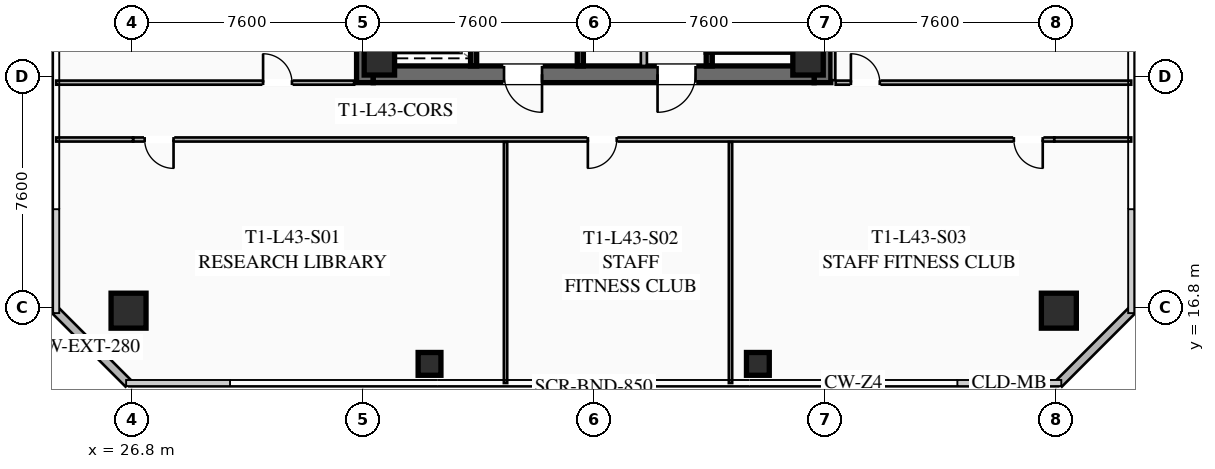
"""IFC4 building model, lengths in metres.
Left out: names, types, materials, properties, quantities, classifications, styles, units other than length and angle.
Written with IfcOpenShell. Run it as: python <this file> out.ifc"""

import sys

from ifc_helpers import new_model, si_unit, direction, frame, frame_2d, origin, origin_2d, place, context, subcontext, project, spatial, rectangle, hollow_rectangle, extrude, element, fill, save


model = new_model("IFC4")
c1 = context("Model", 3, precision=1e-05, world=origin(), true_north=direction((0.0, 1.0)))
c2 = subcontext(c1, "Body", "Model", "MODEL_VIEW")
j1 = project(units=[si_unit("LENGTHUNIT", "METRE"), si_unit("PLANEANGLEUNIT", "RADIAN")], contexts=[c1])
p1 = place(None, origin())
s1 = spatial("IfcSite", under=j1, at=p1, CompositionType="ELEMENT")
p2 = place(p1, origin())
s2 = spatial("IfcBuilding", under=s1, at=p2, CompositionType="ELEMENT")
p3 = place(p2, frame((0.0, 0.0, 160.55)))
s3 = spatial("IfcBuildingStorey", under=s2, at=p3, CompositionType="ELEMENT", Elevation=160.55)
for number, where, z_axis, x_axis in (
    (1, (34.475, 24.2, 0.0), (0.0, 0.0, 1.0), (0.0, 1.0, 0.0)),
    (2, (49.525, 39.8, 0.0), (0.0, 0.0, 1.0), (0.0, -1.0, 0.0)),
):
    element("IfcWall", number, at=place(p3, frame(where, z_axis=z_axis, x_axis=x_axis)), inside=s3, PredefinedType="SHEAR", context=c2, shape_type="SweptSolid", body=[
        extrude(rectangle(XDim=15.6, YDim=0.55, at=frame_2d((7.8, 0.0))), origin(), (0.0, 0.0, 1.0), 3.55),
    ])
p4 = place(p3, frame((49.25, 24.475, 0.0), z_axis=(0.0, 0.0, 1.0), x_axis=(-1.0, 0.0, 0.0)))
e3 = element("IfcWall", 3, at=p4, inside=s3, PredefinedType="SHEAR", context=c2, shape_type="SweptSolid", body=[
    extrude(rectangle(XDim=14.5, YDim=0.55, at=frame_2d((7.25, 0.0))), origin(), (0.0, 0.0, 1.0), 3.55),
])
p5 = place(p4, frame((8.95, 0.0, 0.0)))
e4 = element("IfcOpeningElement", 4, at=p5, cuts=e3, PredefinedType="OPENING", context=c2, shape_type="SweptSolid", body=[
    extrude(rectangle(XDim=1.25, YDim=2.25, at=frame_2d((0.625, 1.125))), frame((0.0, 0.285, 0.0), z_axis=(0.0, -1.0, 0.0), x_axis=(1.0, 0.0, 0.0)), (0.0, 0.0, 1.0), 0.57),
])
p6 = place(p4, frame((3.9, 0.0, 0.0)))
e5 = element("IfcOpeningElement", 5, at=p6, cuts=e3, PredefinedType="OPENING", context=c2, shape_type="SweptSolid", body=[
    extrude(rectangle(XDim=1.25, YDim=2.25, at=frame_2d((0.625, 1.125))), frame((0.0, 0.285, 0.0), z_axis=(0.0, -1.0, 0.0), x_axis=(1.0, 0.0, 0.0)), (0.0, 0.0, 1.0), 0.57),
])
for number, where, z_axis, x_axis in (
    (6, (34.95, 24.95, 0.0), (0.0, 0.0, 1.0), (1.0, 0.0, 0.0)),
    (7, (49.05, 24.95, 0.0), (0.0, 0.0, 1.0), (1.0, 0.0, 0.0)),
):
    element("IfcColumn", number, at=place(p3, frame(where, z_axis=z_axis, x_axis=x_axis)), inside=s3, PredefinedType="COLUMN", context=c2, shape_type="SweptSolid", body=[
        extrude(hollow_rectangle(XDim=1.0, YDim=1.0, WallThickness=0.04, at=origin_2d()), origin(), (0.0, 0.0, 1.0), 3.37),
    ])
for number, where, z_axis, x_axis in (
    (8, (26.7, 16.7, 0.0), (0.0, 0.0, 1.0), (1.0, 0.0, 0.0)),
    (9, (57.3, 16.7, 0.0), (0.0, 0.0, 1.0), (1.0, 0.0, 0.0)),
):
    element("IfcColumn", number, at=place(p3, frame(where, z_axis=z_axis, x_axis=x_axis)), inside=s3, PredefinedType="COLUMN", context=c2, shape_type="SweptSolid", body=[
        extrude(hollow_rectangle(XDim=1.15, YDim=1.15, WallThickness=0.045, at=origin_2d()), origin(), (0.0, 0.0, 1.0), 3.37),
    ])
for number, where, z_axis, x_axis in (
    (10, (36.6, 14.95, 0.0), (0.0, 0.0, 1.0), (1.0, 0.0, 0.0)),
    (11, (47.4, 14.95, 0.0), (0.0, 0.0, 1.0), (1.0, 0.0, 0.0)),
):
    element("IfcColumn", number, at=place(p3, frame(where, z_axis=z_axis, x_axis=x_axis)), inside=s3, PredefinedType="COLUMN", context=c2, shape_type="SweptSolid", body=[
        extrude(hollow_rectangle(XDim=0.75, YDim=0.75, WallThickness=0.032, at=origin_2d()), origin(), (0.0, 0.0, 1.0), 3.37),
    ])
for number, where, z_axis, x_axis in (
    (12, (26.7, 14.3, 0.0), (0.0, 0.0, 1.0), (-0.707, 0.707, 0.0)),
    (13, (59.7, 16.7, 0.0), (0.0, 0.0, 1.0), (-0.707, -0.707, 0.0)),
):
    element("IfcWall", number, at=place(p3, frame(where, z_axis=z_axis, x_axis=x_axis)), inside=s3, PredefinedType="SOLIDWALL", context=c2, shape_type="SweptSolid", body=[
        extrude(rectangle(XDim=3.394, YDim=0.28, at=frame_2d((1.697, 0.0))), origin(), (0.0, 0.0, 1.0), 3.37),
    ])
p7 = place(p3, frame((45.8, 32.8, 0.0), z_axis=(0.0, 0.0, 1.0), x_axis=(0.0, -1.0, 0.0)))
e14 = element("IfcWall", 14, at=p7, inside=s3, PredefinedType="SHEAR", context=c2, shape_type="SweptSolid", body=[
    extrude(rectangle(XDim=8.05, YDim=0.2, at=frame_2d((4.025, 0.0))), origin(), (0.0, 0.0, 1.0), 3.37),
])
p8 = place(p7, frame((0.45, 0.0, 0.0)))
e15 = element("IfcOpeningElement", 15, at=p8, cuts=e14, PredefinedType="OPENING", context=c2, shape_type="SweptSolid", body=[
    extrude(rectangle(XDim=1.15, YDim=2.2, at=frame_2d((0.575, 1.1))), frame((0.0, 0.11, 0.0), z_axis=(0.0, -1.0, 0.0), x_axis=(1.0, 0.0, 0.0)), (0.0, 0.0, 1.0), 0.22),
])
p9 = place(p3, frame((41.56, 24.75, 0.0), z_axis=(0.0, 0.0, 1.0), x_axis=(0.0, 1.0, 0.0)))
e16 = element("IfcWall", 16, at=p9, inside=s3, PredefinedType="SHEAR", context=c2, shape_type="SweptSolid", body=[
    extrude(rectangle(XDim=14.5, YDim=0.2, at=frame_2d((7.25, 0.0))), origin(), (0.0, 0.0, 1.0), 3.37),
])
p10 = place(p3, frame((38.05, 24.75, 0.0), z_axis=(0.0, 0.0, 1.0), x_axis=(0.0, 1.0, 0.0)))
e17 = element("IfcWall", 17, at=p10, inside=s3, PredefinedType="SHEAR", context=c2, shape_type="SweptSolid", body=[
    extrude(rectangle(XDim=6.45, YDim=0.2, at=frame_2d((3.225, 0.0))), origin(), (0.0, 0.0, 1.0), 3.37),
])
p11 = place(p10, frame((4.875, 0.0, 0.0)))
e18 = element("IfcOpeningElement", 18, at=p11, cuts=e17, PredefinedType="OPENING", context=c2, shape_type="SweptSolid", body=[
    extrude(rectangle(XDim=1.3, YDim=2.25, at=frame_2d((0.65, 1.125))), frame((0.0, 0.11, 0.0), z_axis=(0.0, -1.0, 0.0), x_axis=(1.0, 0.0, 0.0)), (0.0, 0.0, 1.0), 0.22),
])
p12 = place(p10, frame((2.875, 0.0, 0.0)))
e19 = element("IfcOpeningElement", 19, at=p12, cuts=e17, PredefinedType="OPENING", context=c2, shape_type="SweptSolid", body=[
    extrude(rectangle(XDim=1.3, YDim=2.25, at=frame_2d((0.65, 1.125))), frame((0.0, 0.11, 0.0), z_axis=(0.0, -1.0, 0.0), x_axis=(1.0, 0.0, 0.0)), (0.0, 0.0, 1.0), 0.22),
])
p13 = place(p10, frame((0.675, 0.0, 0.0)))
e20 = element("IfcOpeningElement", 20, at=p13, cuts=e17, PredefinedType="OPENING", context=c2, shape_type="SweptSolid", body=[
    extrude(rectangle(XDim=1.3, YDim=2.25, at=frame_2d((0.65, 1.125))), frame((0.0, 0.11, 0.0), z_axis=(0.0, -1.0, 0.0), x_axis=(1.0, 0.0, 0.0)), (0.0, 0.0, 1.0), 0.22),
])
p14 = place(p3, frame((43.65, 24.75, 0.0), z_axis=(0.0, 0.0, 1.0), x_axis=(0.0, 1.0, 0.0)))
e21 = element("IfcWall", 21, at=p14, inside=s3, PredefinedType="SOLIDWALL", context=c2, shape_type="SweptSolid", body=[
    extrude(rectangle(XDim=6.9, YDim=0.2, at=frame_2d((3.45, 0.0))), origin(), (0.0, 0.0, 1.0), 2.723),
])
p15 = place(p14, frame((0.85, 0.0, 0.0)))
e22 = element("IfcOpeningElement", 22, at=p15, cuts=e21, PredefinedType="OPENING", context=c2, shape_type="SweptSolid", body=[
    extrude(rectangle(XDim=0.95, YDim=2.05, at=frame_2d((0.475, 1.025))), frame((0.0, 0.11, 0.0), z_axis=(0.0, -1.0, 0.0), x_axis=(1.0, 0.0, 0.0)), (0.0, 0.0, 1.0), 0.22),
])
p16 = place(p14, frame((4.8, 0.0, 0.0)))
e23 = element("IfcOpeningElement", 23, at=p16, cuts=e21, PredefinedType="OPENING", context=c2, shape_type="SweptSolid", body=[
    extrude(rectangle(XDim=1.05, YDim=2.2, at=frame_2d((0.525, 1.1))), frame((0.0, 0.11, 0.0), z_axis=(0.0, -1.0, 0.0), x_axis=(1.0, 0.0, 0.0)), (0.0, 0.0, 1.0), 0.22),
])
p17 = place(p3, frame((57.15, 22.33, 0.0), z_axis=(0.0, 0.0, 1.0), x_axis=(-1.0, 0.0, 0.0)))
e24 = element("IfcWall", 24, at=p17, inside=s3, PredefinedType="PARTITIONING", context=c2, shape_type="SweptSolid", body=[
    extrude(rectangle(XDim=30.3, YDim=0.135, at=frame_2d((15.15, 0.0))), origin(), (0.0, 0.0, 1.0), 2.723),
])
p18 = place(p17, frame((28.97, 0.0, 0.0)))
e25 = element("IfcOpeningElement", 25, at=p18, cuts=e24, PredefinedType="OPENING", context=c2, shape_type="SweptSolid", body=[
    extrude(rectangle(XDim=0.95, YDim=2.05, at=frame_2d((0.475, 1.025))), frame((0.0, 0.077, 0.0), z_axis=(0.0, -1.0, 0.0), x_axis=(1.0, 0.0, 0.0)), (0.0, 0.0, 1.0), 0.155),
])
p19 = place(p17, frame((14.392, 0.0, 0.0)))
e26 = element("IfcOpeningElement", 26, at=p19, cuts=e24, PredefinedType="OPENING", context=c2, shape_type="SweptSolid", body=[
    extrude(rectangle(XDim=0.95, YDim=2.05, at=frame_2d((0.475, 1.025))), frame((0.0, 0.077, 0.0), z_axis=(0.0, -1.0, 0.0), x_axis=(1.0, 0.0, 0.0)), (0.0, 0.0, 1.0), 0.155),
])
p20 = place(p17, frame((0.38, 0.0, 0.0)))
e27 = element("IfcOpeningElement", 27, at=p20, cuts=e24, PredefinedType="OPENING", context=c2, shape_type="SweptSolid", body=[
    extrude(rectangle(XDim=0.95, YDim=2.05, at=frame_2d((0.475, 1.025))), frame((0.0, 0.077, 0.0), z_axis=(0.0, -1.0, 0.0), x_axis=(1.0, 0.0, 0.0)), (0.0, 0.0, 1.0), 0.155),
])
for number, where, z_axis, x_axis in (
    (28, (24.32, 22.33, 0.0), (0.0, 0.0, 1.0), (1.0, 0.0, 0.0)),
    (29, (57.15, 22.33, 0.0), (0.0, 0.0, 1.0), (1.0, 0.0, 0.0)),
):
    element("IfcWall", number, at=place(p3, frame(where, z_axis=z_axis, x_axis=x_axis)), inside=s3, PredefinedType="PARTITIONING", context=c2, shape_type="SweptSolid", body=[
        extrude(rectangle(XDim=2.53, YDim=0.135, at=frame_2d((1.265, 0.0))), origin(), (0.0, 0.0, 1.0), 2.723),
    ])
for number, where, z_axis, x_axis in (
    (30, (39.1, 14.32, 0.0), (0.0, 0.0, 1.0), (0.0, 1.0, 0.0)),
    (31, (46.5, 14.32, 0.0), (0.0, 0.0, 1.0), (0.0, 1.0, 0.0)),
):
    element("IfcWall", number, at=place(p3, frame(where, z_axis=z_axis, x_axis=x_axis)), inside=s3, PredefinedType="PARTITIONING", context=c2, shape_type="SweptSolid", body=[
        extrude(rectangle(XDim=7.93, YDim=0.11, at=frame_2d((3.965, 0.0))), origin(), (0.0, 0.0, 1.0), 2.723),
    ])
p21 = place(p3, frame((49.88, 39.72, 0.0), z_axis=(0.0, 0.0, 1.0), x_axis=(0.0, -1.0, 0.0)))
e32 = element("IfcWall", 32, at=p21, inside=s3, PredefinedType="PARTITIONING", context=c2, shape_type="SweptSolid", body=[
    extrude(rectangle(XDim=15.44, YDim=0.135, at=frame_2d((7.72, 0.0))), origin(), (0.0, 0.0, 1.0), 2.723),
])
p22 = place(p3, frame((49.96, 24.2, 0.0), z_axis=(0.0, 0.0, 1.0), x_axis=(1.0, 0.0, 0.0)))
e33 = element("IfcWall", 33, at=p22, inside=s3, PredefinedType="PARTITIONING", context=c2, shape_type="SweptSolid", body=[
    extrude(rectangle(XDim=9.72, YDim=0.135, at=frame_2d((4.86, 0.0))), origin(), (0.0, 0.0, 1.0), 2.723),
])
p23 = place(p22, frame((0.5, 0.0, 0.0)))
e34 = element("IfcOpeningElement", 34, at=p23, cuts=e33, PredefinedType="OPENING", context=c2, shape_type="SweptSolid", body=[
    extrude(rectangle(XDim=0.95, YDim=2.05, at=frame_2d((0.475, 1.025))), frame((0.0, 0.077, 0.0), z_axis=(0.0, -1.0, 0.0), x_axis=(1.0, 0.0, 0.0)), (0.0, 0.0, 1.0), 0.155),
])
p24 = place(p3, frame((24.32, 24.2, 0.0), z_axis=(0.0, 0.0, 1.0), x_axis=(1.0, 0.0, 0.0)))
e35 = element("IfcWall", 35, at=p24, inside=s3, PredefinedType="PARTITIONING", context=c2, shape_type="SweptSolid", body=[
    extrude(rectangle(XDim=9.8, YDim=0.135, at=frame_2d((4.9, 0.0))), origin(), (0.0, 0.0, 1.0), 2.723),
])
p25 = place(p24, frame((6.805, 0.0, 0.0)))
e36 = element("IfcOpeningElement", 36, at=p25, cuts=e35, PredefinedType="OPENING", context=c2, shape_type="SweptSolid", body=[
    extrude(rectangle(XDim=0.95, YDim=2.05, at=frame_2d((0.475, 1.025))), frame((0.0, 0.077, 0.0), z_axis=(0.0, -1.0, 0.0), x_axis=(1.0, 0.0, 0.0)), (0.0, 0.0, 1.0), 0.155),
])
p26 = place(p5, origin())
e37 = element("IfcDoor", 37, at=p26, inside=s3, OperationType="SINGLE_SWING_LEFT", PredefinedType="DOOR", context=c2, shape_type="SweptSolid", body=[
    extrude(rectangle(XDim=1.25, YDim=2.25, at=frame_2d((0.625, 1.125))), frame((0.0, 0.025, 0.0), z_axis=(0.0, -1.0, 0.0), x_axis=(1.0, 0.0, 0.0)), (0.0, 0.0, 1.0), 0.05),
])
fill(e4, e37)
p27 = place(p6, origin())
e38 = element("IfcDoor", 38, at=p27, inside=s3, OperationType="SINGLE_SWING_RIGHT", PredefinedType="DOOR", context=c2, shape_type="SweptSolid", body=[
    extrude(rectangle(XDim=1.25, YDim=2.25, at=frame_2d((0.625, 1.125))), frame((0.0, 0.025, 0.0), z_axis=(0.0, -1.0, 0.0), x_axis=(1.0, 0.0, 0.0)), (0.0, 0.0, 1.0), 0.05),
])
fill(e5, e38)
p28 = place(p18, origin())
e39 = element("IfcDoor", 39, at=p28, inside=s3, OperationType="SINGLE_SWING_LEFT", PredefinedType="DOOR", context=c2, shape_type="SweptSolid", body=[
    extrude(rectangle(XDim=0.95, YDim=2.05, at=frame_2d((0.475, 1.025))), frame((0.0, 0.025, 0.0), z_axis=(0.0, -1.0, 0.0), x_axis=(1.0, 0.0, 0.0)), (0.0, 0.0, 1.0), 0.05),
])
fill(e25, e39)
p29 = place(p19, origin())
e40 = element("IfcDoor", 40, at=p29, inside=s3, OperationType="SINGLE_SWING_RIGHT", PredefinedType="DOOR", context=c2, shape_type="SweptSolid", body=[
    extrude(rectangle(XDim=0.95, YDim=2.05, at=frame_2d((0.475, 1.025))), frame((0.0, 0.025, 0.0), z_axis=(0.0, -1.0, 0.0), x_axis=(1.0, 0.0, 0.0)), (0.0, 0.0, 1.0), 0.05),
])
fill(e26, e40)
p30 = place(p20, origin())
e41 = element("IfcDoor", 41, at=p30, inside=s3, OperationType="SINGLE_SWING_LEFT", PredefinedType="DOOR", context=c2, shape_type="SweptSolid", body=[
    extrude(rectangle(XDim=0.95, YDim=2.05, at=frame_2d((0.475, 1.025))), frame((0.0, 0.025, 0.0), z_axis=(0.0, -1.0, 0.0), x_axis=(1.0, 0.0, 0.0)), (0.0, 0.0, 1.0), 0.05),
])
fill(e27, e41)
p31 = place(p23, origin())
e42 = element("IfcDoor", 42, at=p31, inside=s3, OperationType="SINGLE_SWING_LEFT", PredefinedType="DOOR", context=c2, shape_type="SweptSolid", body=[
    extrude(rectangle(XDim=0.95, YDim=2.05, at=frame_2d((0.475, 1.025))), frame((0.0, 0.025, 0.0), z_axis=(0.0, -1.0, 0.0), x_axis=(1.0, 0.0, 0.0)), (0.0, 0.0, 1.0), 0.05),
])
fill(e34, e42)
p32 = place(p25, origin())
e43 = element("IfcDoor", 43, at=p32, inside=s3, OperationType="SINGLE_SWING_LEFT", PredefinedType="DOOR", context=c2, shape_type="SweptSolid", body=[
    extrude(rectangle(XDim=0.95, YDim=2.05, at=frame_2d((0.475, 1.025))), frame((0.0, 0.025, 0.0), z_axis=(0.0, -1.0, 0.0), x_axis=(1.0, 0.0, 0.0)), (0.0, 0.0, 1.0), 0.05),
])
fill(e36, e43)
save(model, sys.argv[1])
